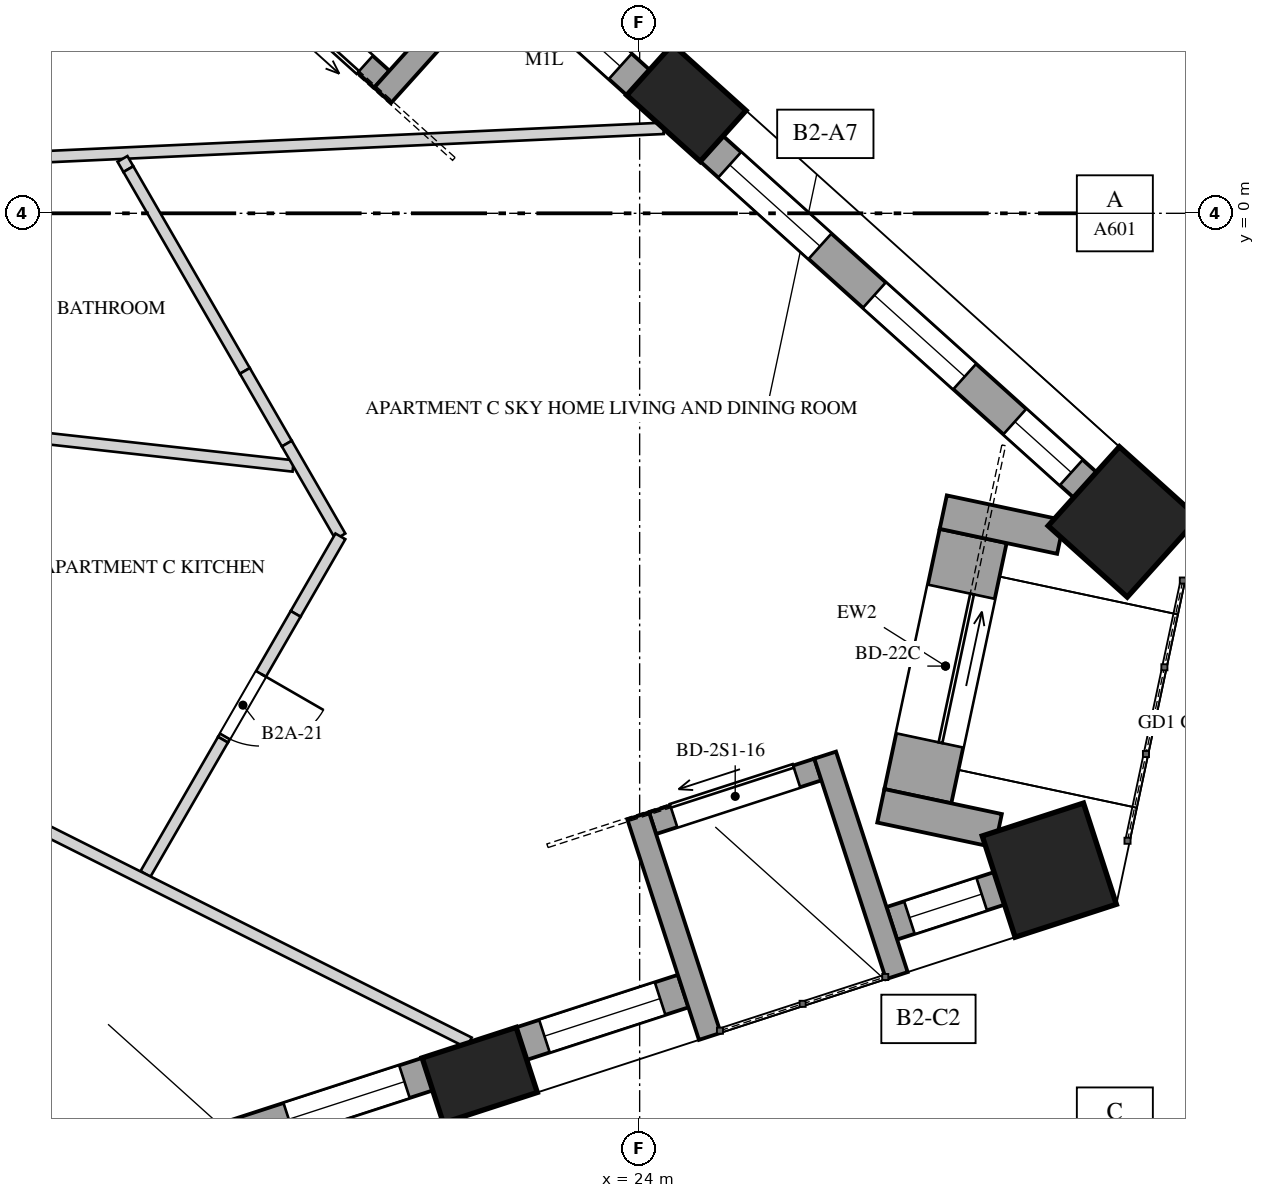
"""IFC4 building model, lengths in metres.
Left out: names, types, materials, properties, quantities, classifications, styles, units other than length and angle.
Written with IfcOpenShell. Run it as: python <this file> out.ifc"""

import sys

from ifc_helpers import new_model, si_unit, direction, frame, frame_2d, origin, origin_2d, place, context, subcontext, project, spatial, polyline, rectangle, outline, extrude, element, fill, save


model = new_model("IFC4")
c1 = context("Model", 3, precision=1e-05, world=origin(), true_north=direction((0.0, 1.0)))
c2 = subcontext(c1, "Body", "Model", "MODEL_VIEW")
j1 = project(units=[si_unit("LENGTHUNIT", "METRE"), si_unit("PLANEANGLEUNIT", "RADIAN")], contexts=[c1])
p1 = place(None, origin())
s1 = spatial("IfcSite", under=j1, at=p1, CompositionType="ELEMENT")
p2 = place(p1, origin())
s2 = spatial("IfcBuilding", under=s1, at=p2, CompositionType="ELEMENT")
p3 = place(p2, frame((0.0, 0.0, 88.4)))
s3 = spatial("IfcBuildingStorey", under=s2, at=p3, CompositionType="ELEMENT", Elevation=88.4)
p4 = place(p3, frame((21.896, -11.339, -0.35), z_axis=(0.0, 0.0, 1.0), x_axis=(0.951056516295, 0.309016994375, 0.0)))
e1 = element("IfcColumn", 1, at=p4, inside=s3, PredefinedType="COLUMN", context=c2, shape_type="SweptSolid", body=[
    extrude(rectangle(XDim=1.3, YDim=0.9, at=origin_2d()), origin(), (0.0, 0.0, 1.0), 4.35),
])
for number, where, z_axis, x_axis in (
    (2, (29.389, -8.641, -0.35), (0.0, 0.0, 1.0), (0.951, 0.309, 0.0)),
    (3, (30.363, -4.06, -0.35), (0.0, 0.0, 1.0), (-0.743, 0.669, 0.0)),
):
    element("IfcColumn", number, at=place(p3, frame(where, z_axis=z_axis, x_axis=x_axis)), inside=s3, PredefinedType="COLUMN", context=c2, shape_type="SweptSolid", body=[
        extrude(rectangle(XDim=1.4, YDim=1.4, at=origin_2d()), origin(), (0.0, 0.0, 1.0), 4.35),
    ])
p5 = place(p3, frame((24.615, 1.452, -0.35), z_axis=(0.0, 0.0, 1.0), x_axis=(-0.743144825477, 0.669130606359, 0.0)))
e4 = element("IfcColumn", 4, at=p5, inside=s3, PredefinedType="COLUMN", context=c2, shape_type="SweptSolid", body=[
    extrude(rectangle(XDim=1.3, YDim=0.9, at=origin_2d()), origin(), (0.0, 0.0, 1.0), 4.35),
])
p6 = place(p3, frame((14.208, -13.6, 0.0), z_axis=(0.0, 0.0, 1.0), x_axis=(0.951057467065, 0.309014068191, 0.0)))
e5 = element("IfcWall", 5, at=p6, inside=s3, PredefinedType="SOLIDWALL", context=c2, shape_type="SweptSolid", body=[
    extrude(rectangle(XDim=7.36, YDim=0.45, at=frame_2d((3.68, 0.0))), origin(), (0.0, 0.0, 1.0), 3.3),
])
p7 = place(p6, frame((0.318, 0.0, 0.7)))
e6 = element("IfcOpeningElement", 6, at=p7, cuts=e5, PredefinedType="OPENING", context=c2, shape_type="SweptSolid", body=[
    extrude(rectangle(XDim=1.6, YDim=2.3, at=frame_2d((0.8, 1.15))), frame((0.0, 0.235, 0.0), z_axis=(0.0, -1.0, 0.0), x_axis=(1.0, 0.0, 0.0)), (0.0, 0.0, 1.0), 0.47),
])
p8 = place(p6, frame((2.88, 0.0, 0.7)))
e7 = element("IfcOpeningElement", 7, at=p8, cuts=e5, PredefinedType="OPENING", context=c2, shape_type="SweptSolid", body=[
    extrude(rectangle(XDim=1.6, YDim=2.3, at=frame_2d((0.8, 1.15))), frame((0.0, 0.235, 0.0), z_axis=(0.0, -1.0, 0.0), x_axis=(1.0, 0.0, 0.0)), (0.0, 0.0, 1.0), 0.47),
])
p9 = place(p6, frame((5.442, 0.0, 0.7)))
e8 = element("IfcOpeningElement", 8, at=p9, cuts=e5, PredefinedType="OPENING", context=c2, shape_type="SweptSolid", body=[
    extrude(rectangle(XDim=1.6, YDim=2.3, at=frame_2d((0.8, 1.15))), frame((0.0, 0.235, 0.0), z_axis=(0.0, -1.0, 0.0), x_axis=(1.0, 0.0, 0.0)), (0.0, 0.0, 1.0), 0.47),
])
p10 = place(p3, frame((22.445, -10.924, 0.0), z_axis=(0.0, 0.0, 1.0), x_axis=(0.951067749801, 0.30898241906, 0.0)))
e9 = element("IfcWall", 9, at=p10, inside=s3, PredefinedType="SOLIDWALL", context=c2, shape_type="SweptSolid", body=[
    extrude(rectangle(XDim=2.237, YDim=0.45, at=frame_2d((1.118, 0.0))), origin(), (0.0, 0.0, 1.0), 3.3),
])
p11 = place(p10, frame((0.318, 0.0, 0.7)))
e10 = element("IfcOpeningElement", 10, at=p11, cuts=e9, PredefinedType="OPENING", context=c2, shape_type="SweptSolid", body=[
    extrude(rectangle(XDim=1.6, YDim=2.3, at=frame_2d((0.8, 1.15))), frame((0.0, 0.235, 0.0), z_axis=(0.0, -1.0, 0.0), x_axis=(1.0, 0.0, 0.0)), (0.0, 0.0, 1.0), 0.47),
])
p12 = place(p3, frame((27.317, -9.341, 0.0), z_axis=(0.0, 0.0, 1.0), x_axis=(0.951053373744, 0.309026665985, 0.0)))
e11 = element("IfcWall", 11, at=p12, inside=s3, PredefinedType="SOLIDWALL", context=c2, shape_type="SweptSolid", body=[
    extrude(rectangle(XDim=1.487, YDim=0.45, at=frame_2d((0.743, 0.0))), origin(), (0.0, 0.0, 1.0), 3.3),
])
p13 = place(p12, frame((0.243, 0.0, 0.7)))
e12 = element("IfcOpeningElement", 12, at=p13, cuts=e11, PredefinedType="OPENING", context=c2, shape_type="SweptSolid", body=[
    extrude(rectangle(XDim=1.0, YDim=1.8, at=frame_2d((0.5, 0.9))), frame((0.0, 0.235, 0.0), z_axis=(0.0, -1.0, 0.0), x_axis=(1.0, 0.0, 0.0)), (0.0, 0.0, 1.0), 0.47),
])
p14 = place(p3, frame((29.86, -3.573, 0.0), z_axis=(0.0, 0.0, 1.0), x_axis=(-0.743161908204, 0.669111633582, 0.0)))
e13 = element("IfcWall", 13, at=p14, inside=s3, PredefinedType="SOLIDWALL", context=c2, shape_type="SweptSolid", body=[
    extrude(rectangle(XDim=6.61, YDim=0.45, at=frame_2d((3.305, 0.0))), origin(), (0.0, 0.0, 1.0), 3.3),
])
p15 = place(p14, frame((0.243, 0.0, 0.7)))
e14 = element("IfcOpeningElement", 14, at=p15, cuts=e13, PredefinedType="OPENING", context=c2, shape_type="SweptSolid", body=[
    extrude(rectangle(XDim=1.0, YDim=1.8, at=frame_2d((0.5, 0.9))), frame((0.0, 0.235, 0.0), z_axis=(0.0, -1.0, 0.0), x_axis=(1.0, 0.0, 0.0)), (0.0, 0.0, 1.0), 0.47),
])
p16 = place(p14, frame((2.13, 0.0, 0.7)))
e15 = element("IfcOpeningElement", 15, at=p16, cuts=e13, PredefinedType="OPENING", context=c2, shape_type="SweptSolid", body=[
    extrude(rectangle(XDim=1.6, YDim=2.3, at=frame_2d((0.8, 1.15))), frame((0.0, 0.235, 0.0), z_axis=(0.0, -1.0, 0.0), x_axis=(1.0, 0.0, 0.0)), (0.0, 0.0, 1.0), 0.47),
])
p17 = place(p14, frame((4.692, 0.0, 0.7)))
e16 = element("IfcOpeningElement", 16, at=p17, cuts=e13, PredefinedType="OPENING", context=c2, shape_type="SweptSolid", body=[
    extrude(rectangle(XDim=1.6, YDim=2.3, at=frame_2d((0.8, 1.15))), frame((0.0, 0.235, 0.0), z_axis=(0.0, -1.0, 0.0), x_axis=(1.0, 0.0, 0.0)), (0.0, 0.0, 1.0), 0.47),
])
p18 = place(p3, frame((23.981, 1.72, 0.0), z_axis=(0.0, 0.0, 1.0), x_axis=(-0.743142151309, 0.669133576311, 0.0)))
e17 = element("IfcWall", 17, at=p18, inside=s3, PredefinedType="SOLIDWALL", context=c2, shape_type="SweptSolid", body=[
    extrude(rectangle(XDim=2.237, YDim=0.45, at=frame_2d((1.118, 0.0))), origin(), (0.0, 0.0, 1.0), 3.3),
])
p19 = place(p18, frame((0.318, 0.0, 0.7)))
e18 = element("IfcOpeningElement", 18, at=p19, cuts=e17, PredefinedType="OPENING", context=c2, shape_type="SweptSolid", body=[
    extrude(rectangle(XDim=1.6, YDim=1.8, at=frame_2d((0.8, 0.9))), frame((0.0, 0.235, 0.0), z_axis=(0.0, -1.0, 0.0), x_axis=(1.0, 0.0, 0.0)), (0.0, 0.0, 1.0), 0.47),
])
p20 = place(p3, frame((24.17, -8.024, 0.0), z_axis=(0.0, 0.0, 1.0), x_axis=(0.95103720697, 0.309076416051, 0.0)))
e19 = element("IfcWall", 19, at=p20, inside=s3, PredefinedType="SOLIDWALL", context=c2, shape_type="SweptSolid", body=[
    extrude(rectangle(XDim=2.287, YDim=0.3, at=frame_2d((1.144, 0.0))), origin(), (0.0, 0.0, 1.0), 3.3),
])
p21 = place(p20, frame((0.293, 0.0, 0.0)))
e20 = element("IfcOpeningElement", 20, at=p21, cuts=e19, PredefinedType="OPENING", context=c2, shape_type="SweptSolid", body=[
    extrude(rectangle(XDim=1.7, YDim=2.4, at=frame_2d((0.85, 1.2))), frame((0.0, 0.16, 0.0), z_axis=(0.0, -1.0, 0.0), x_axis=(1.0, 0.0, 0.0)), (0.0, 0.0, 1.0), 0.32),
])
p22 = place(p3, frame((24.923, -10.828, 0.0), z_axis=(0.0, 0.0, 1.0), x_axis=(-0.308966615996, 0.951072883748, 0.0)))
e21 = element("IfcWall", 21, at=p22, inside=s3, PredefinedType="SOLIDWALL", context=c2, shape_type="SweptSolid", body=[
    extrude(rectangle(XDim=3.05, YDim=0.3, at=frame_2d((1.525, 0.0))), origin(), (0.0, 0.0, 1.0), 3.3),
])
p23 = place(p3, frame((27.383, -10.029, 0.0), z_axis=(0.0, 0.0, 1.0), x_axis=(-0.308990138358, 0.951065241925, 0.0)))
e22 = element("IfcWall", 22, at=p23, inside=s3, PredefinedType="SOLIDWALL", context=c2, shape_type="SweptSolid", body=[
    extrude(rectangle(XDim=3.05, YDim=0.3, at=frame_2d((1.525, 0.0))), origin(), (0.0, 0.0, 1.0), 3.3),
])
p24 = place(p3, frame((20.607, 1.764, 0.0), z_axis=(0.0, 0.0, 1.0), x_axis=(-0.743182653308, 0.669088591909, 0.0)))
e23 = element("IfcWall", 23, at=p24, inside=s3, PredefinedType="SOLIDWALL", context=c2, shape_type="SweptSolid", body=[
    extrude(rectangle(XDim=2.287, YDim=0.3, at=frame_2d((1.143, 0.0))), origin(), (0.0, 0.0, 1.0), 3.3),
])
p25 = place(p24, frame((0.293, 0.0, 0.0)))
e24 = element("IfcOpeningElement", 24, at=p25, cuts=e23, PredefinedType="OPENING", context=c2, shape_type="SweptSolid", body=[
    extrude(rectangle(XDim=1.7, YDim=2.4, at=frame_2d((0.85, 1.2))), frame((0.0, 0.16, 0.0), z_axis=(0.0, -1.0, 0.0), x_axis=(1.0, 0.0, 0.0)), (0.0, 0.0, 1.0), 0.32),
])
p26 = place(p3, frame((22.659, 3.819, 0.0), z_axis=(0.0, 0.0, 1.0), x_axis=(-0.669115082961, -0.743158802514, 0.0)))
e25 = element("IfcWall", 25, at=p26, inside=s3, PredefinedType="SOLIDWALL", context=c2, shape_type="SweptSolid", body=[
    extrude(rectangle(XDim=3.05, YDim=0.3, at=frame_2d((1.525, 0.0))), origin(), (0.0, 0.0, 1.0), 3.3),
])
p27 = place(p3, frame((28.388, -4.245, 0.0), z_axis=(0.0, 0.0, 1.0), x_axis=(-0.207866264069, -0.978157255385, 0.0)))
e26 = element("IfcWall", 26, at=p27, inside=s3, PredefinedType="SOLIDWALL", context=c2, shape_type="SweptSolid", body=[
    extrude(rectangle(XDim=3.5, YDim=0.9, at=frame_2d((1.75, 0.0))), origin(), (0.0, 0.0, 1.0), 3.3),
])
p28 = place(p27, frame((0.75, 0.0, 0.0)))
e27 = element("IfcOpeningElement", 27, at=p28, cuts=e26, PredefinedType="OPENING", context=c2, shape_type="SweptSolid", body=[
    extrude(rectangle(XDim=2.0, YDim=2.4, at=frame_2d((1.0, 1.2))), frame((0.0, 0.46, 0.0), z_axis=(0.0, -1.0, 0.0), x_axis=(1.0, 0.0, 0.0)), (0.0, 0.0, 1.0), 0.92),
])
for number, where, z_axis, x_axis in (
    (28, (29.539, -4.26, 0.0), (0.0, 0.0, 1.0), (-0.978, 0.208, 0.0)),
    (29, (28.718, -8.123, 0.0), (0.0, 0.0, 1.0), (-0.978, 0.208, 0.0)),
):
    element("IfcWall", number, at=place(p3, frame(where, z_axis=z_axis, x_axis=x_axis)), inside=s3, PredefinedType="SOLIDWALL", context=c2, shape_type="SweptSolid", body=[
        extrude(rectangle(XDim=1.579, YDim=0.45, at=frame_2d((0.79, 0.0))), origin(), (0.0, 0.0, 1.0), 2.55),
    ])
p29 = place(p3, frame((12.851, 0.591, 0.0), z_axis=(0.0, 0.0, 1.0), x_axis=(0.998944359646, 0.045936546805, 0.0)))
e30 = element("IfcWall", 30, at=p29, inside=s3, PredefinedType="PARTITIONING", context=c2, shape_type="SweptSolid", body=[
    extrude(rectangle(XDim=11.475, YDim=0.15, at=frame_2d((5.737, 0.0))), origin(), (0.0, 0.0, 1.0), 2.55),
])
p30 = place(p3, frame((14.814, -2.808, 0.0), z_axis=(0.0, 0.0, 1.0), x_axis=(0.993844670605, -0.110782537929, 0.0)))
e31 = element("IfcWall", 31, at=p30, inside=s3, PredefinedType="PARTITIONING", context=c2, shape_type="SweptSolid", body=[
    extrude(rectangle(XDim=4.656, YDim=0.15, at=frame_2d((2.328, 0.0))), origin(), (0.0, 0.0, 1.0), 3.65),
])
p31 = place(p3, frame((17.196, 0.716, 0.0), z_axis=(0.0, 0.0, 1.0), x_axis=(0.499858525911, -0.866107068482, 0.0)))
e32 = element("IfcWall", 32, at=p31, inside=s3, PredefinedType="PARTITIONING", context=c2, shape_type="SweptSolid", body=[
    extrude(rectangle(XDim=0.155, YDim=0.15, at=frame_2d((0.078, 0.0))), origin(), (0.0, 0.0, 1.0), 2.55),
])
p32 = place(p3, frame((17.274, 0.581, 0.0), z_axis=(0.0, 0.0, 1.0), x_axis=(0.500037354383, -0.866003836147, 0.0)))
e33 = element("IfcWall", 33, at=p32, inside=s3, PredefinedType="PARTITIONING", context=c2, shape_type="SweptSolid", body=[
    extrude(rectangle(XDim=3.065, YDim=0.15, at=frame_2d((1.532, 0.0))), origin(), (0.0, 0.0, 1.0), 3.65),
])
p33 = place(p3, frame((18.806, -2.073, 0.0), z_axis=(0.0, 0.0, 1.0), x_axis=(0.499894629757, -0.866086230776, 0.0)))
e34 = element("IfcWall", 34, at=p33, inside=s3, PredefinedType="PARTITIONING", context=c2, shape_type="SweptSolid", body=[
    extrude(rectangle(XDim=1.105, YDim=0.15, at=frame_2d((0.552, 0.0))), origin(), (0.0, 0.0, 1.0), 2.55),
])
p34 = place(p3, frame((19.358, -3.03, 0.0), z_axis=(0.0, 0.0, 1.0), x_axis=(0.500052415518, -0.865995139556, 0.0)))
e35 = element("IfcWall", 35, at=p34, inside=s3, PredefinedType="PARTITIONING", context=c2, shape_type="SweptSolid", body=[
    extrude(rectangle(XDim=1.409, YDim=0.15, at=frame_2d((0.705, 0.0))), origin(), (0.0, 0.0, 1.0), 3.65),
])
p35 = place(p3, frame((20.063, -4.25, 0.0), z_axis=(0.0, 0.0, 1.0), x_axis=(-0.500063427972, -0.865988780531, 0.0)))
e36 = element("IfcWall", 36, at=p35, inside=s3, PredefinedType="PARTITIONING", context=c2, shape_type="SweptSolid", body=[
    extrude(rectangle(XDim=1.177, YDim=0.15, at=frame_2d((0.589, 0.0))), origin(), (0.0, 0.0, 1.0), 3.65),
])
p36 = place(p3, frame((19.474, -5.27, 0.0), z_axis=(0.0, 0.0, 1.0), x_axis=(-0.499998833779, -0.866026077102, 0.0)))
e37 = element("IfcWall", 37, at=p36, inside=s3, PredefinedType="PARTITIONING", context=c2, shape_type="SweptSolid", body=[
    extrude(outline(polyline([(0.0, 0.0), (1.912, 0.0), (1.912, 3.65), (0.9, 3.65), (0.9, 2.55), (0.0, 2.55), (0.0, 0.0)])), frame((0.0, 0.075, 0.0), z_axis=(0.0, -1.0, 0.0), x_axis=(1.0, 0.0, 0.0)), (0.0, 0.0, 1.0), 0.15),
])
p37 = place(p36, frame((0.912, 0.0, 0.0)))
e38 = element("IfcOpeningElement", 38, at=p37, cuts=e37, PredefinedType="OPENING", context=c2, shape_type="SweptSolid", body=[
    extrude(rectangle(XDim=0.95, YDim=2.4, at=frame_2d((0.475, 1.2))), frame((0.0, 0.085, 0.0), z_axis=(0.0, -1.0, 0.0), x_axis=(1.0, 0.0, 0.0)), (0.0, 0.0, 1.0), 0.17),
])
p38 = place(p3, frame((18.518, -6.925, 0.0), z_axis=(0.0, 0.0, 1.0), x_axis=(-0.499950448838, -0.866054010271, 0.0)))
e39 = element("IfcWall", 39, at=p38, inside=s3, PredefinedType="PARTITIONING", context=c2, shape_type="SweptSolid", body=[
    extrude(rectangle(XDim=2.039, YDim=0.15, at=frame_2d((1.02, 0.0))), origin(), (0.0, 0.0, 1.0), 3.65),
])
p39 = place(p3, frame((21.757, -10.911, 0.0), z_axis=(0.0, 0.0, 1.0), x_axis=(-0.893895152109, 0.448276094652, 0.0)))
e40 = element("IfcWall", 40, at=p39, inside=s3, PredefinedType="PARTITIONING", context=c2, shape_type="SweptSolid", body=[
    extrude(rectangle(XDim=8.637, YDim=0.15, at=frame_2d((4.319, 0.0))), origin(), (0.0, 0.0, 1.0), 2.75),
])
p40 = place(p9, origin())
e41 = element("IfcWindow", 41, at=p40, inside=s3, PartitioningType="SINGLE_PANEL", PredefinedType="WINDOW", context=c2, shape_type="SweptSolid", body=[
    extrude(rectangle(XDim=1.6, YDim=2.3, at=frame_2d((0.8, 1.15))), frame((0.0, 0.03, 0.0), z_axis=(0.0, -1.0, 0.0), x_axis=(1.0, 0.0, 0.0)), (0.0, 0.0, 1.0), 0.06),
])
fill(e8, e41)
p41 = place(p11, origin())
e42 = element("IfcWindow", 42, at=p41, inside=s3, PartitioningType="SINGLE_PANEL", PredefinedType="WINDOW", context=c2, shape_type="SweptSolid", body=[
    extrude(rectangle(XDim=1.6, YDim=2.3, at=frame_2d((0.8, 1.15))), frame((0.0, 0.03, 0.0), z_axis=(0.0, -1.0, 0.0), x_axis=(1.0, 0.0, 0.0)), (0.0, 0.0, 1.0), 0.06),
])
fill(e10, e42)
p42 = place(p13, origin())
e43 = element("IfcWindow", 43, at=p42, inside=s3, PartitioningType="SINGLE_PANEL", PredefinedType="WINDOW", context=c2, shape_type="SweptSolid", body=[
    extrude(rectangle(XDim=1.0, YDim=1.8, at=frame_2d((0.5, 0.9))), frame((0.0, 0.03, 0.0), z_axis=(0.0, -1.0, 0.0), x_axis=(1.0, 0.0, 0.0)), (0.0, 0.0, 1.0), 0.06),
])
fill(e12, e43)
p43 = place(p15, origin())
e44 = element("IfcWindow", 44, at=p43, inside=s3, PartitioningType="SINGLE_PANEL", PredefinedType="WINDOW", context=c2, shape_type="SweptSolid", body=[
    extrude(rectangle(XDim=1.0, YDim=1.8, at=frame_2d((0.5, 0.9))), frame((0.0, 0.03, 0.0), z_axis=(0.0, -1.0, 0.0), x_axis=(1.0, 0.0, 0.0)), (0.0, 0.0, 1.0), 0.06),
])
fill(e14, e44)
p44 = place(p16, origin())
e45 = element("IfcWindow", 45, at=p44, inside=s3, PartitioningType="SINGLE_PANEL", PredefinedType="WINDOW", context=c2, shape_type="SweptSolid", body=[
    extrude(rectangle(XDim=1.6, YDim=2.3, at=frame_2d((0.8, 1.15))), frame((0.0, 0.03, 0.0), z_axis=(0.0, -1.0, 0.0), x_axis=(1.0, 0.0, 0.0)), (0.0, 0.0, 1.0), 0.06),
])
fill(e15, e45)
p45 = place(p17, origin())
e46 = element("IfcWindow", 46, at=p45, inside=s3, PartitioningType="SINGLE_PANEL", PredefinedType="WINDOW", context=c2, shape_type="SweptSolid", body=[
    extrude(rectangle(XDim=1.6, YDim=2.3, at=frame_2d((0.8, 1.15))), frame((0.0, 0.03, 0.0), z_axis=(0.0, -1.0, 0.0), x_axis=(1.0, 0.0, 0.0)), (0.0, 0.0, 1.0), 0.06),
])
fill(e16, e46)
p46 = place(p19, origin())
e47 = element("IfcWindow", 47, at=p46, inside=s3, PartitioningType="SINGLE_PANEL", PredefinedType="WINDOW", context=c2, shape_type="SweptSolid", body=[
    extrude(rectangle(XDim=1.6, YDim=1.8, at=frame_2d((0.8, 0.9))), frame((0.0, 0.03, 0.0), z_axis=(0.0, -1.0, 0.0), x_axis=(1.0, 0.0, 0.0)), (0.0, 0.0, 1.0), 0.06),
])
fill(e18, e47)
p47 = place(p21, origin())
e48 = element("IfcDoor", 48, at=p47, inside=s3, OperationType="SLIDING_TO_LEFT", PredefinedType="DOOR", context=c2, shape_type="SweptSolid", body=[
    extrude(rectangle(XDim=1.7, YDim=2.4, at=frame_2d((0.85, 1.2))), frame((0.0, 0.025, 0.0), z_axis=(0.0, -1.0, 0.0), x_axis=(1.0, 0.0, 0.0)), (0.0, 0.0, 1.0), 0.05),
])
fill(e20, e48)
p48 = place(p25, origin())
e49 = element("IfcDoor", 49, at=p48, inside=s3, OperationType="SLIDING_TO_LEFT", PredefinedType="DOOR", context=c2, shape_type="SweptSolid", body=[
    extrude(rectangle(XDim=1.7, YDim=2.4, at=frame_2d((0.85, 1.2))), frame((0.0, 0.025, 0.0), z_axis=(0.0, -1.0, 0.0), x_axis=(1.0, 0.0, 0.0)), (0.0, 0.0, 1.0), 0.05),
])
fill(e24, e49)
p49 = place(p28, origin())
e50 = element("IfcDoor", 50, at=p49, inside=s3, OperationType="SLIDING_TO_LEFT", PredefinedType="DOOR", context=c2, shape_type="SweptSolid", body=[
    extrude(rectangle(XDim=2.0, YDim=2.4, at=frame_2d((1.0, 1.2))), frame((0.0, 0.025, 0.0), z_axis=(0.0, -1.0, 0.0), x_axis=(1.0, 0.0, 0.0)), (0.0, 0.0, 1.0), 0.05),
])
fill(e27, e50)
p50 = place(p37, origin())
e51 = element("IfcDoor", 51, at=p50, inside=s3, OperationType="SINGLE_SWING_LEFT", PredefinedType="DOOR", context=c2, shape_type="SweptSolid", body=[
    extrude(rectangle(XDim=0.95, YDim=2.4, at=frame_2d((0.475, 1.2))), frame((0.0, 0.025, 0.0), z_axis=(0.0, -1.0, 0.0), x_axis=(1.0, 0.0, 0.0)), (0.0, 0.0, 1.0), 0.05),
])
fill(e38, e51)
save(model, sys.argv[1])
